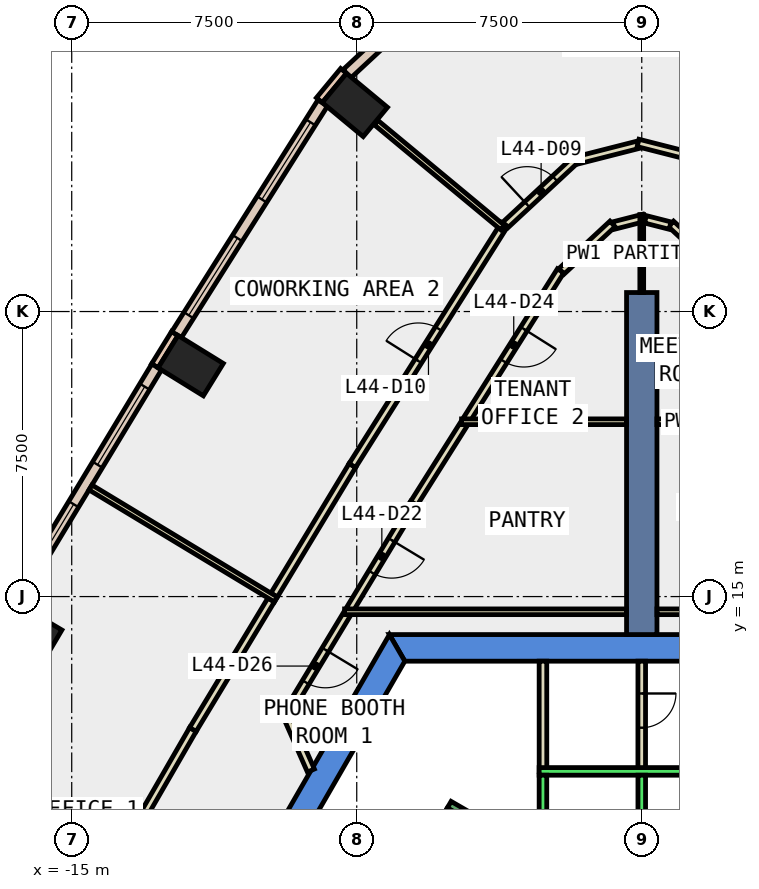
"""IFC4 building model, lengths in metres.
Left out: names, types, materials, properties, quantities, classifications, styles, units other than length and angle.
Written with IfcOpenShell. Run it as: python <this file> out.ifc"""

import sys

from ifc_helpers import new_model, si_unit, direction, frame, frame_2d, origin, origin_2d, place, context, subcontext, project, spatial, polyline, rectangle, outline, extrude, element, fill, save


model = new_model("IFC4")
c1 = context("Model", 3, precision=1e-05, world=origin(), true_north=direction((0.0, 1.0)))
c2 = subcontext(c1, "Body", "Model", "MODEL_VIEW")
j1 = project(units=[si_unit("LENGTHUNIT", "METRE"), si_unit("PLANEANGLEUNIT", "RADIAN")], contexts=[c1])
p1 = place(None, origin())
s1 = spatial("IfcSite", under=j1, at=p1, CompositionType="ELEMENT")
p2 = place(p1, origin())
s2 = spatial("IfcBuilding", under=s1, at=p2, CompositionType="ELEMENT")
p3 = place(p2, frame((0.0, 0.0, 198.2)))
s3 = spatial("IfcBuildingStorey", under=s2, at=p3, CompositionType="ELEMENT", Elevation=198.2)
for number, where, z_axis, x_axis in (
    (1, (-7.549, 27.935, -0.4), (0.0, 0.0, 1.0), (0.639, 0.769, 0.0)),
    (2, (-11.869, 21.076, -0.4), (0.0, 0.0, 1.0), (0.525, 0.851, 0.0)),
    (3, (-16.116, 14.046, -0.4), (0.0, 0.0, 1.0), (0.509, 0.861, 0.0)),
):
    element("IfcColumn", number, at=place(p3, frame(where, z_axis=z_axis, x_axis=x_axis)), inside=s3, PredefinedType="COLUMN", context=c2, shape_type="SweptSolid", body=[
        extrude(rectangle(XDim=1.0, YDim=1.4, at=origin_2d()), origin(), (0.0, 0.0, 1.0), 4.2),
    ])
p4 = place(p3, frame((0.0, 0.0, -0.4)))
e4 = element("IfcWall", 4, at=p4, inside=s3, PredefinedType="SHEAR", context=c2, shape_type="SweptSolid", body=[
    extrude(outline(polyline([(6.64, 14.0), (-6.64, 14.0), (-6.235, 13.3), (6.235, 13.3), (6.64, 14.0)])), origin(), (0.0, 0.0, 1.0), 4.2),
])
p5 = place(p3, frame((0.0, 0.0, -0.4)))
e5 = element("IfcWall", 5, at=p5, inside=s3, PredefinedType="SHEAR", context=c2, shape_type="SweptSolid", body=[
    extrude(outline(polyline([(-11.834, 5.002), (-11.228, 4.652), (-6.235, 13.3), (-6.64, 14.0), (-11.834, 5.002)])), origin(), (0.0, 0.0, 1.0), 4.2),
])
p6 = place(p3, frame((0.0, 14.0, -0.4), z_axis=(0.0, 0.0, 1.0), x_axis=(0.0, 1.0, 0.0)))
e6 = element("IfcWall", 6, at=p6, inside=s3, PredefinedType="SHEAR", context=c2, shape_type="SweptSolid", body=[
    extrude(rectangle(XDim=9.0, YDim=0.8, at=frame_2d((4.5, 0.0))), origin(), (0.0, 0.0, 1.0), 4.2),
])
p7 = place(p3, frame((-7.846, 28.831, 0.0), z_axis=(0.0, 0.0, 1.0), x_axis=(-0.637972365578, -0.770059257953, 0.0)))
e7 = element("IfcWall", 7, at=p7, inside=s3, PredefinedType="STANDARD", context=c2, shape_type="SweptSolid", body=[
    extrude(rectangle(XDim=1.0, YDim=0.2, at=frame_2d((0.5, 0.0))), origin(), (0.0, 0.0, 1.0), 3.8),
])
p8 = place(p3, frame((-12.287, 21.922, 0.0), z_axis=(0.0, 0.0, 1.0), x_axis=(-0.525648735675, -0.850701714282, 0.0)))
e8 = element("IfcWall", 8, at=p8, inside=s3, PredefinedType="STANDARD", context=c2, shape_type="SweptSolid", body=[
    extrude(rectangle(XDim=1.0, YDim=0.2, at=frame_2d((0.5, 0.0))), origin(), (0.0, 0.0, 1.0), 3.8),
])
p9 = place(p3, frame((-4.996, 31.319, 0.0), z_axis=(0.0, 0.0, 1.0), x_axis=(-0.732897351132, -0.680339233547, 0.0)))
e9 = element("IfcWall", 9, at=p9, inside=s3, PredefinedType="STANDARD", context=c2, shape_type="SweptSolid", body=[
    extrude(rectangle(XDim=3.767, YDim=0.3, at=frame_2d((1.884, 0.0))), origin(), (0.0, 0.0, 1.0), 3.8),
])
p10 = place(p9, frame((1.184, 0.0, 0.9)))
e10 = element("IfcOpeningElement", 10, at=p10, cuts=e9, PredefinedType="OPENING", context=c2, shape_type="SweptSolid", body=[
    extrude(rectangle(XDim=1.4, YDim=2.6, at=frame_2d((0.7, 1.3))), frame((0.0, 0.16, 0.0), z_axis=(0.0, -1.0, 0.0), x_axis=(1.0, 0.0, 0.0)), (0.0, 0.0, 1.0), 0.32),
])
p11 = place(p3, frame((-8.394, 27.988, 0.0), z_axis=(0.0, 0.0, 1.0), x_axis=(-0.533680752529, -0.845686025887, 0.0)))
e11 = element("IfcWall", 11, at=p11, inside=s3, PredefinedType="STANDARD", context=c2, shape_type="SweptSolid", body=[
    extrude(rectangle(XDim=7.208, YDim=0.3, at=frame_2d((3.604, 0.0))), origin(), (0.0, 0.0, 1.0), 3.8),
])
p12 = place(p11, frame((0.602, 0.0, 0.9)))
e12 = element("IfcOpeningElement", 12, at=p12, cuts=e11, PredefinedType="OPENING", context=c2, shape_type="SweptSolid", body=[
    extrude(rectangle(XDim=2.4, YDim=2.6, at=frame_2d((1.2, 1.3))), frame((0.0, 0.16, 0.0), z_axis=(0.0, -1.0, 0.0), x_axis=(1.0, 0.0, 0.0)), (0.0, 0.0, 1.0), 0.32),
])
p13 = place(p11, frame((4.206, 0.0, 0.9)))
e13 = element("IfcOpeningElement", 13, at=p13, cuts=e11, PredefinedType="OPENING", context=c2, shape_type="SweptSolid", body=[
    extrude(rectangle(XDim=2.4, YDim=2.6, at=frame_2d((1.2, 1.3))), frame((0.0, 0.16, 0.0), z_axis=(0.0, -1.0, 0.0), x_axis=(1.0, 0.0, 0.0)), (0.0, 0.0, 1.0), 0.32),
])
p14 = place(p3, frame((-12.765, 21.043, 0.0), z_axis=(0.0, 0.0, 1.0), x_axis=(-0.517159962006, -0.855888762456, 0.0)))
e14 = element("IfcWall", 14, at=p14, inside=s3, PredefinedType="STANDARD", context=c2, shape_type="SweptSolid", body=[
    extrude(rectangle(XDim=7.23, YDim=0.3, at=frame_2d((3.615, 0.0))), origin(), (0.0, 0.0, 1.0), 3.8),
])
p15 = place(p14, frame((0.607, 0.0, 0.9)))
e15 = element("IfcOpeningElement", 15, at=p15, cuts=e14, PredefinedType="OPENING", context=c2, shape_type="SweptSolid", body=[
    extrude(rectangle(XDim=2.4, YDim=2.6, at=frame_2d((1.2, 1.3))), frame((0.0, 0.16, 0.0), z_axis=(0.0, -1.0, 0.0), x_axis=(1.0, 0.0, 0.0)), (0.0, 0.0, 1.0), 0.32),
])
p16 = place(p14, frame((4.222, 0.0, 0.9)))
e16 = element("IfcOpeningElement", 16, at=p16, cuts=e14, PredefinedType="OPENING", context=c2, shape_type="SweptSolid", body=[
    extrude(rectangle(XDim=2.4, YDim=2.6, at=frame_2d((1.2, 1.3))), frame((0.0, 0.16, 0.0), z_axis=(0.0, -1.0, 0.0), x_axis=(1.0, 0.0, 0.0)), (0.0, 0.0, 1.0), 0.32),
])
p17 = place(p3, frame((-7.759, 14.536, 0.0), z_axis=(0.0, 0.0, 1.0), x_axis=(-0.516926279395, -0.856029918678, 0.0)))
e17 = element("IfcWall", 17, at=p17, inside=s3, PredefinedType="PARTITIONING", context=c2, shape_type="SweptSolid", body=[
    extrude(rectangle(XDim=3.188, YDim=0.2, at=frame_2d((1.594, 0.0))), origin(), (0.0, 0.0, 1.0), 3.8),
])
p18 = place(p17, frame((1.094, 0.0, 0.0)))
e18 = element("IfcOpeningElement", 18, at=p18, cuts=e17, PredefinedType="OPENING", context=c2, shape_type="SweptSolid", body=[
    extrude(rectangle(XDim=1.0, YDim=2.1, at=frame_2d((0.5, 1.05))), frame((0.0, 0.11, 0.0), z_axis=(0.0, -1.0, 0.0), x_axis=(1.0, 0.0, 0.0)), (0.0, 0.0, 1.0), 0.22),
])
p19 = place(p3, frame((-9.315, 11.801, 0.0), z_axis=(0.0, 0.0, 1.0), x_axis=(0.403943240321, -0.914784050254, 0.0)))
e19 = element("IfcWall", 19, at=p19, inside=s3, PredefinedType="PARTITIONING", context=c2, shape_type="SweptSolid", body=[
    extrude(rectangle(XDim=1.507, YDim=0.2, at=frame_2d((0.754, 0.0))), origin(), (0.0, 0.0, 1.0), 3.8),
])
p20 = place(p3, frame((-4.682, 19.537, 0.0), z_axis=(0.0, 0.0, 1.0), x_axis=(-0.533579580306, -0.845749863423, 0.0)))
e20 = element("IfcWall", 20, at=p20, inside=s3, PredefinedType="PARTITIONING", context=c2, shape_type="SweptSolid", body=[
    extrude(rectangle(XDim=2.467, YDim=0.2, at=frame_2d((1.233, 0.0))), origin(), (0.0, 0.0, 1.0), 3.8),
])
p21 = place(p3, frame((-5.998, 17.451, 0.0), z_axis=(0.0, 0.0, 1.0), x_axis=(-0.516919907997, -0.856033766108, 0.0)))
e21 = element("IfcWall", 21, at=p21, inside=s3, PredefinedType="PARTITIONING", context=c2, shape_type="SweptSolid", body=[
    extrude(rectangle(XDim=3.256, YDim=0.2, at=frame_2d((1.628, 0.0))), origin(), (0.0, 0.0, 1.0), 3.8),
])
p22 = place(p21, frame((1.128, 0.0, 0.0)))
e22 = element("IfcOpeningElement", 22, at=p22, cuts=e21, PredefinedType="OPENING", context=c2, shape_type="SweptSolid", body=[
    extrude(rectangle(XDim=1.0, YDim=2.1, at=frame_2d((0.5, 1.05))), frame((0.0, 0.11, 0.0), z_axis=(0.0, -1.0, 0.0), x_axis=(1.0, 0.0, 0.0)), (0.0, 0.0, 1.0), 0.22),
])
p23 = place(p3, frame((2.116, 23.554, 0.0), z_axis=(0.0, 0.0, 1.0), x_axis=(-0.732722533409, 0.680527507919, 0.0)))
e23 = element("IfcWall", 23, at=p23, inside=s3, PredefinedType="PARTITIONING", context=c2, shape_type="SweptSolid", body=[
    extrude(rectangle(XDim=1.838, YDim=0.2, at=frame_2d((0.919, 0.0))), origin(), (0.0, 0.0, 1.0), 3.8),
])
p24 = place(p3, frame((0.745, 24.761, 0.0), z_axis=(0.0, 0.0, 1.0), x_axis=(-0.969081307177, 0.246741605895, 0.0)))
e24 = element("IfcWall", 24, at=p24, inside=s3, PredefinedType="PARTITIONING", context=c2, shape_type="SweptSolid", body=[
    extrude(rectangle(XDim=0.669, YDim=0.2, at=frame_2d((0.334, 0.0))), origin(), (0.0, 0.0, 1.0), 3.8),
])
p25 = place(p3, frame((0.048, 24.963, 0.0), z_axis=(0.0, 0.0, 1.0), x_axis=(-0.969098470359, -0.246674187438, 0.0)))
e25 = element("IfcWall", 25, at=p25, inside=s3, PredefinedType="PARTITIONING", context=c2, shape_type="SweptSolid", body=[
    extrude(rectangle(XDim=0.819, YDim=0.2, at=frame_2d((0.409, 0.0))), origin(), (0.0, 0.0, 1.0), 3.8),
])
p26 = place(p3, frame((-0.769, 24.805, 0.0), z_axis=(0.0, 0.0, 1.0), x_axis=(-0.732722533409, -0.680527507919, 0.0)))
e26 = element("IfcWall", 26, at=p26, inside=s3, PredefinedType="PARTITIONING", context=c2, shape_type="SweptSolid", body=[
    extrude(rectangle(XDim=1.838, YDim=0.2, at=frame_2d((0.919, 0.0))), origin(), (0.0, 0.0, 1.0), 3.8),
])
p27 = place(p3, frame((-2.136, 23.571, 0.0), z_axis=(0.0, 0.0, 1.0), x_axis=(-0.533664968846, -0.845695986171, 0.0)))
e27 = element("IfcWall", 27, at=p27, inside=s3, PredefinedType="PARTITIONING", context=c2, shape_type="SweptSolid", body=[
    extrude(rectangle(XDim=4.621, YDim=0.2, at=frame_2d((2.311, 0.0))), origin(), (0.0, 0.0, 1.0), 3.8),
])
p28 = place(p27, frame((1.81, 0.0, 0.0)))
e28 = element("IfcOpeningElement", 28, at=p28, cuts=e27, PredefinedType="OPENING", context=c2, shape_type="SweptSolid", body=[
    extrude(rectangle(XDim=1.0, YDim=2.1, at=frame_2d((0.5, 1.05))), frame((0.0, 0.11, 0.0), z_axis=(0.0, -1.0, 0.0), x_axis=(1.0, 0.0, 0.0)), (0.0, 0.0, 1.0), 0.22),
])
p29 = place(p3, frame((-3.59, 24.778, 0.0), z_axis=(0.0, 0.0, 1.0), x_axis=(0.732939008525, 0.680294355248, 0.0)))
e29 = element("IfcWall", 29, at=p29, inside=s3, PredefinedType="PARTITIONING", context=c2, shape_type="SweptSolid", body=[
    extrude(rectangle(XDim=2.569, YDim=0.2, at=frame_2d((1.285, 0.0))), origin(), (0.0, 0.0, 1.0), 3.8),
])
p30 = place(p29, frame((0.785, 0.0, 0.0)))
e30 = element("IfcOpeningElement", 30, at=p30, cuts=e29, PredefinedType="OPENING", context=c2, shape_type="SweptSolid", body=[
    extrude(rectangle(XDim=1.0, YDim=2.1, at=frame_2d((0.5, 1.05))), frame((0.0, 0.11, 0.0), z_axis=(0.0, -1.0, 0.0), x_axis=(1.0, 0.0, 0.0)), (0.0, 0.0, 1.0), 0.22),
])
p31 = place(p3, frame((-1.683, 26.483, 0.0), z_axis=(0.0, 0.0, 1.0), x_axis=(0.969053723172, 0.246849917169, 0.0)))
e31 = element("IfcWall", 31, at=p31, inside=s3, PredefinedType="PARTITIONING", context=c2, shape_type="SweptSolid", body=[
    extrude(rectangle(XDim=1.637, YDim=0.2, at=frame_2d((0.818, 0.0))), origin(), (0.0, 0.0, 1.0), 3.8),
])
p32 = place(p3, frame((-0.097, 26.936, 0.0), z_axis=(0.0, 0.0, 1.0), x_axis=(0.969093707519, -0.246692898252, 0.0)))
e32 = element("IfcWall", 32, at=p32, inside=s3, PredefinedType="PARTITIONING", context=c2, shape_type="SweptSolid", body=[
    extrude(rectangle(XDim=1.837, YDim=0.2, at=frame_2d((0.918, 0.0))), origin(), (0.0, 0.0, 1.0), 3.8),
])
p33 = place(p3, frame((-9.674, 15.039, 0.0), z_axis=(0.0, 0.0, 1.0), x_axis=(0.516918251554, 0.856034766356, 0.0)))
e33 = element("IfcWall", 33, at=p33, inside=s3, PredefinedType="PARTITIONING", context=c2, shape_type="SweptSolid", body=[
    extrude(rectangle(XDim=3.983, YDim=0.2, at=frame_2d((1.992, 0.0))), origin(), (0.0, 0.0, 1.0), 3.8),
])
p34 = place(p3, frame((-7.615, 18.449, 0.0), z_axis=(0.0, 0.0, 1.0), x_axis=(0.533699180497, 0.845674396406, 0.0)))
e34 = element("IfcWall", 34, at=p34, inside=s3, PredefinedType="PARTITIONING", context=c2, shape_type="SweptSolid", body=[
    extrude(rectangle(XDim=7.504, YDim=0.2, at=frame_2d((3.752, 0.0))), origin(), (0.0, 0.0, 1.0), 3.8),
])
p35 = place(p34, frame((3.252, 0.0, 0.0)))
e35 = element("IfcOpeningElement", 35, at=p35, cuts=e34, PredefinedType="OPENING", context=c2, shape_type="SweptSolid", body=[
    extrude(rectangle(XDim=1.0, YDim=2.1, at=frame_2d((0.5, 1.05))), frame((0.0, 0.11, 0.0), z_axis=(0.0, -1.0, 0.0), x_axis=(1.0, 0.0, 0.0)), (0.0, 0.0, 1.0), 0.22),
])
p36 = place(p3, frame((-15.905, 4.412, 0.0), z_axis=(0.0, 0.0, 1.0), x_axis=(0.5000098125, 0.866019738461, 0.0)))
e36 = element("IfcWall", 36, at=p36, inside=s3, PredefinedType="PARTITIONING", context=c2, shape_type="SweptSolid", body=[
    extrude(rectangle(XDim=8.188, YDim=0.2, at=frame_2d((4.094, 0.0))), origin(), (0.0, 0.0, 1.0), 3.8),
])
p37 = place(p36, frame((3.594, 0.0, 0.0)))
e37 = element("IfcOpeningElement", 37, at=p37, cuts=e36, PredefinedType="OPENING", context=c2, shape_type="SweptSolid", body=[
    extrude(rectangle(XDim=1.0, YDim=2.1, at=frame_2d((0.5, 1.05))), frame((0.0, 0.11, 0.0), z_axis=(0.0, -1.0, 0.0), x_axis=(1.0, 0.0, 0.0)), (0.0, 0.0, 1.0), 0.22),
])
p38 = place(p3, frame((-11.811, 11.503, 0.0), z_axis=(0.0, 0.0, 1.0), x_axis=(0.517135291957, 0.855903668535, 0.0)))
e38 = element("IfcWall", 38, at=p38, inside=s3, PredefinedType="PARTITIONING", context=c2, shape_type="SweptSolid", body=[
    extrude(rectangle(XDim=3.982, YDim=0.2, at=frame_2d((1.991, 0.0))), origin(), (0.0, 0.0, 1.0), 3.8),
])
p39 = place(p3, frame((-2.599, 10.399, 0.0), z_axis=(0.0, 0.0, 1.0), x_axis=(-0.000336615314, 0.999999943345, 0.0)))
e39 = element("IfcWall", 39, at=p39, inside=s3, PredefinedType="PARTITIONING", context=c2, shape_type="SweptSolid", body=[
    extrude(rectangle(XDim=2.901, YDim=0.2, at=frame_2d((1.451, 0.0))), origin(), (0.0, 0.0, 1.0), 3.8),
])
p40 = place(p3, frame((0.0, 13.3, 0.0), z_axis=(0.0, 0.0, 1.0), x_axis=(-0.000336728662, -0.999999943307, 0.0)))
e40 = element("IfcWall", 40, at=p40, inside=s3, PredefinedType="PARTITIONING", context=c2, shape_type="SweptSolid", body=[
    extrude(rectangle(XDim=2.9, YDim=0.2, at=frame_2d((1.45, 0.0))), origin(), (0.0, 0.0, 1.0), 3.8),
])
p41 = place(p40, frame((0.85, 0.0, 0.0)))
e41 = element("IfcOpeningElement", 41, at=p41, cuts=e40, PredefinedType="OPENING", context=c2, shape_type="SweptSolid", body=[
    extrude(rectangle(XDim=0.9, YDim=2.1, at=frame_2d((0.45, 1.05))), frame((0.0, 0.11, 0.0), z_axis=(0.0, -1.0, 0.0), x_axis=(1.0, 0.0, 0.0)), (0.0, 0.0, 1.0), 0.22),
])
p42 = place(p3, frame((7.124, 14.6, 0.0), z_axis=(0.0, 0.0, 1.0), x_axis=(-1.0, 0.0, 0.0)))
e42 = element("IfcWall", 42, at=p42, inside=s3, PredefinedType="PARTITIONING", context=c2, shape_type="SweptSolid", body=[
    extrude(rectangle(XDim=6.724, YDim=0.15, at=frame_2d((3.362, 0.0))), origin(), (0.0, 0.0, 1.0), 3.8),
])
p43 = place(p3, frame((-0.4, 14.6, 0.0), z_axis=(0.0, 0.0, 1.0), x_axis=(-1.0, 0.0, 0.0)))
e43 = element("IfcWall", 43, at=p43, inside=s3, PredefinedType="PARTITIONING", context=c2, shape_type="SweptSolid", body=[
    extrude(rectangle(XDim=7.42, YDim=0.15, at=frame_2d((3.71, 0.0))), origin(), (0.0, 0.0, 1.0), 3.8),
])
for number, where, z_axis, x_axis in (
    (44, (0.4, 19.6, 0.0), (0.0, 0.0, 1.0), (1.0, 0.0, 0.0)),
    (45, (-4.742, 19.6, 0.0), (0.0, 0.0, 1.0), (1.0, 0.0, 0.0)),
):
    element("IfcWall", number, at=place(p3, frame(where, z_axis=z_axis, x_axis=x_axis)), inside=s3, PredefinedType="PARTITIONING", context=c2, shape_type="SweptSolid", body=[
        extrude(rectangle(XDim=4.342, YDim=0.15, at=frame_2d((2.171, 0.0))), origin(), (0.0, 0.0, 1.0), 3.8),
    ])
p44 = place(p3, frame((0.0, 23.0, 0.0), z_axis=(0.0, 0.0, 1.0), x_axis=(0.0, 1.0, 0.0)))
e46 = element("IfcWall", 46, at=p44, inside=s3, PredefinedType="PARTITIONING", context=c2, shape_type="SweptSolid", body=[
    extrude(rectangle(XDim=2.051, YDim=0.1, at=frame_2d((1.025, 0.0))), origin(), (0.0, 0.0, 1.0), 3.8),
])
p45 = place(p3, frame((-3.663, 24.71, 0.0), z_axis=(0.0, 0.0, 1.0), x_axis=(-0.76953221629, 0.638607992505, 0.0)))
e47 = element("IfcWall", 47, at=p45, inside=s3, PredefinedType="PARTITIONING", context=c2, shape_type="SweptSolid", body=[
    extrude(rectangle(XDim=4.33, YDim=0.15, at=frame_2d((2.165, 0.0))), origin(), (0.0, 0.0, 1.0), 3.8),
])
p46 = place(p3, frame((-9.628, 14.924, 0.0), z_axis=(0.0, 0.0, 1.0), x_axis=(-0.855931736607, 0.517088834021, 0.0)))
e48 = element("IfcWall", 48, at=p46, inside=s3, PredefinedType="PARTITIONING", context=c2, shape_type="SweptSolid", body=[
    extrude(rectangle(XDim=5.699, YDim=0.15, at=frame_2d((2.85, 0.0))), origin(), (0.0, 0.0, 1.0), 3.8),
])
p47 = place(p3, frame((2.7, 10.4, 0.0), z_axis=(0.0, 0.0, 1.0), x_axis=(-1.0, 0.0, 0.0)))
e49 = element("IfcWall", 49, at=p47, inside=s3, PredefinedType="STANDARD", context=c2, shape_type="SweptSolid", body=[
    extrude(rectangle(XDim=5.4, YDim=0.2, at=frame_2d((2.7, 0.0))), origin(), (0.0, 0.0, 1.0), 3.8),
])
for number, where, z_axis, x_axis in (
    (50, (0.0, 7.9, 0.0), (0.0, 0.0, 1.0), (0.0, 1.0, 0.0)),
    (51, (-2.6, 7.9, 0.0), (0.0, 0.0, 1.0), (0.0, 1.0, 0.0)),
):
    element("IfcWall", number, at=place(p3, frame(where, z_axis=z_axis, x_axis=x_axis)), inside=s3, PredefinedType="STANDARD", context=c2, shape_type="SweptSolid", body=[
        extrude(rectangle(XDim=2.4, YDim=0.2, at=frame_2d((1.2, 0.0))), origin(), (0.0, 0.0, 1.0), 3.8),
    ])
p48 = place(p3, frame((-1.256, 7.324, 0.0), z_axis=(0.0, 0.0, 1.0), x_axis=(-0.866046073146, 0.499964197906, 0.0)))
e52 = element("IfcWall", 52, at=p48, inside=s3, PredefinedType="STANDARD", context=c2, shape_type="SweptSolid", body=[
    extrude(rectangle(XDim=4.4, YDim=0.2, at=frame_2d((2.2, 0.0))), origin(), (0.0, 0.0, 1.0), 3.8),
])
p49 = place(p48, frame((2.4, 0.0, 0.0)))
e53 = element("IfcOpeningElement", 53, at=p49, cuts=e52, PredefinedType="OPENING", context=c2, shape_type="SweptSolid", body=[
    extrude(rectangle(XDim=1.1, YDim=2.2, at=frame_2d((0.55, 1.1))), frame((0.0, 0.11, 0.0), z_axis=(0.0, -1.0, 0.0), x_axis=(1.0, 0.0, 0.0)), (0.0, 0.0, 1.0), 0.22),
])
p50 = place(p3, frame((-5.03, 9.388, 0.0), z_axis=(0.0, 0.0, 1.0), x_axis=(-0.499978703459, -0.866037698999, 0.0)))
e54 = element("IfcWall", 54, at=p50, inside=s3, PredefinedType="STANDARD", context=c2, shape_type="SweptSolid", body=[
    extrude(rectangle(XDim=6.9, YDim=0.2, at=frame_2d((3.45, 0.0))), origin(), (0.0, 0.0, 1.0), 3.8),
])
p51 = place(p12, origin())
e55 = element("IfcWindow", 55, at=p51, inside=s3, PartitioningType="SINGLE_PANEL", PredefinedType="WINDOW", context=c2, shape_type="SweptSolid", body=[
    extrude(rectangle(XDim=2.4, YDim=2.6, at=frame_2d((1.2, 1.3))), frame((0.0, 0.03, 0.0), z_axis=(0.0, -1.0, 0.0), x_axis=(1.0, 0.0, 0.0)), (0.0, 0.0, 1.0), 0.06),
])
fill(e12, e55)
p52 = place(p13, origin())
e56 = element("IfcWindow", 56, at=p52, inside=s3, PartitioningType="SINGLE_PANEL", PredefinedType="WINDOW", context=c2, shape_type="SweptSolid", body=[
    extrude(rectangle(XDim=2.4, YDim=2.6, at=frame_2d((1.2, 1.3))), frame((0.0, 0.03, 0.0), z_axis=(0.0, -1.0, 0.0), x_axis=(1.0, 0.0, 0.0)), (0.0, 0.0, 1.0), 0.06),
])
fill(e13, e56)
p53 = place(p15, origin())
e57 = element("IfcWindow", 57, at=p53, inside=s3, PartitioningType="SINGLE_PANEL", PredefinedType="WINDOW", context=c2, shape_type="SweptSolid", body=[
    extrude(rectangle(XDim=2.4, YDim=2.6, at=frame_2d((1.2, 1.3))), frame((0.0, 0.03, 0.0), z_axis=(0.0, -1.0, 0.0), x_axis=(1.0, 0.0, 0.0)), (0.0, 0.0, 1.0), 0.06),
])
fill(e15, e57)
p54 = place(p16, origin())
e58 = element("IfcWindow", 58, at=p54, inside=s3, PartitioningType="SINGLE_PANEL", PredefinedType="WINDOW", context=c2, shape_type="SweptSolid", body=[
    extrude(rectangle(XDim=2.4, YDim=2.6, at=frame_2d((1.2, 1.3))), frame((0.0, 0.03, 0.0), z_axis=(0.0, -1.0, 0.0), x_axis=(1.0, 0.0, 0.0)), (0.0, 0.0, 1.0), 0.06),
])
fill(e16, e58)
p55 = place(p30, origin())
e59 = element("IfcDoor", 59, at=p55, inside=s3, OperationType="SINGLE_SWING_LEFT", PredefinedType="DOOR", context=c2, shape_type="SweptSolid", body=[
    extrude(rectangle(XDim=1.0, YDim=2.1, at=frame_2d((0.5, 1.05))), frame((0.0, 0.025, 0.0), z_axis=(0.0, -1.0, 0.0), x_axis=(1.0, 0.0, 0.0)), (0.0, 0.0, 1.0), 0.05),
])
fill(e30, e59)
p56 = place(p35, origin())
e60 = element("IfcDoor", 60, at=p56, inside=s3, OperationType="SINGLE_SWING_RIGHT", PredefinedType="DOOR", context=c2, shape_type="SweptSolid", body=[
    extrude(rectangle(XDim=1.0, YDim=2.1, at=frame_2d((0.5, 1.05))), frame((0.0, 0.025, 0.0), z_axis=(0.0, -1.0, 0.0), x_axis=(1.0, 0.0, 0.0)), (0.0, 0.0, 1.0), 0.05),
])
fill(e35, e60)
p57 = place(p22, origin())
e61 = element("IfcDoor", 61, at=p57, inside=s3, OperationType="SINGLE_SWING_RIGHT", PredefinedType="DOOR", context=c2, shape_type="SweptSolid", body=[
    extrude(rectangle(XDim=1.0, YDim=2.1, at=frame_2d((0.5, 1.05))), frame((0.0, 0.025, 0.0), z_axis=(0.0, -1.0, 0.0), x_axis=(1.0, 0.0, 0.0)), (0.0, 0.0, 1.0), 0.05),
])
fill(e22, e61)
p58 = place(p28, origin())
e62 = element("IfcDoor", 62, at=p58, inside=s3, OperationType="SINGLE_SWING_LEFT", PredefinedType="DOOR", context=c2, shape_type="SweptSolid", body=[
    extrude(rectangle(XDim=1.0, YDim=2.1, at=frame_2d((0.5, 1.05))), frame((0.0, 0.025, 0.0), z_axis=(0.0, -1.0, 0.0), x_axis=(1.0, 0.0, 0.0)), (0.0, 0.0, 1.0), 0.05),
])
fill(e28, e62)
p59 = place(p18, origin())
e63 = element("IfcDoor", 63, at=p59, inside=s3, OperationType="SINGLE_SWING_LEFT", PredefinedType="DOOR", context=c2, shape_type="SweptSolid", body=[
    extrude(rectangle(XDim=1.0, YDim=2.1, at=frame_2d((0.5, 1.05))), frame((0.0, 0.025, 0.0), z_axis=(0.0, -1.0, 0.0), x_axis=(1.0, 0.0, 0.0)), (0.0, 0.0, 1.0), 0.05),
])
fill(e18, e63)
p60 = place(p41, origin())
e64 = element("IfcDoor", 64, at=p60, inside=s3, OperationType="SINGLE_SWING_RIGHT", PredefinedType="DOOR", context=c2, shape_type="SweptSolid", body=[
    extrude(rectangle(XDim=0.9, YDim=2.1, at=frame_2d((0.45, 1.05))), frame((0.0, 0.025, 0.0), z_axis=(0.0, -1.0, 0.0), x_axis=(1.0, 0.0, 0.0)), (0.0, 0.0, 1.0), 0.05),
])
fill(e41, e64)
save(model, sys.argv[1])
